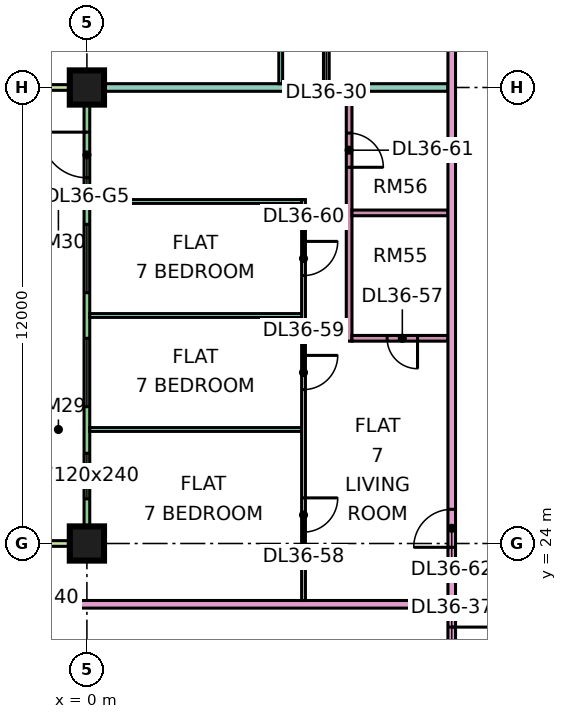
"""IFC4 building model, lengths in metres.
Left out: names, types, materials, properties, quantities, classifications, styles, units other than length and angle.
Written with IfcOpenShell. Run it as: python <this file> out.ifc"""

import sys

from ifc_helpers import new_model, si_unit, direction, frame, frame_2d, origin, origin_2d, place, context, subcontext, project, spatial, rectangle, extrude, element, fill, save


model = new_model("IFC4")
c1 = context("Model", 3, precision=1e-05, world=origin(), true_north=direction((0.0, 1.0)))
c2 = subcontext(c1, "Body", "Model", "MODEL_VIEW")
j1 = project(units=[si_unit("LENGTHUNIT", "METRE"), si_unit("PLANEANGLEUNIT", "RADIAN")], contexts=[c1])
p1 = place(None, origin())
s1 = spatial("IfcSite", under=j1, at=p1, CompositionType="ELEMENT")
p2 = place(p1, origin())
s2 = spatial("IfcBuilding", under=s1, at=p2, CompositionType="ELEMENT")
p3 = place(p2, frame((0.0, 0.0, 161.15)))
s3 = spatial("IfcBuildingStorey", under=s2, at=p3, CompositionType="ELEMENT", Elevation=161.15)
p4 = place(p3, frame((0.0, 24.0, 0.0), z_axis=(0.0, 0.0, 1.0), x_axis=(1.0, 0.0, 0.0)))
e1 = element("IfcColumn", 1, at=p4, inside=s3, PredefinedType="COLUMN", context=c2, shape_type="SweptSolid", body=[
    extrude(rectangle(XDim=0.9, YDim=0.9, at=origin_2d()), origin(), (0.0, 0.0, 1.0), 3.75),
])
p5 = place(p3, frame((0.0, 36.0, 0.0), z_axis=(0.0, 0.0, 1.0), x_axis=(1.0, 0.0, 0.0)))
e2 = element("IfcColumn", 2, at=p5, inside=s3, PredefinedType="COLUMN", context=c2, shape_type="SweptSolid", body=[
    extrude(rectangle(XDim=0.9, YDim=0.9, at=origin_2d()), origin(), (0.0, 0.0, 1.0), 3.75),
])
p6 = place(p3, frame((0.0, 35.925, 0.0), z_axis=(0.0, 0.0, 1.0), x_axis=(0.0, -1.0, 0.0)))
e3 = element("IfcWall", 3, at=p6, inside=s3, PredefinedType="SOLIDWALL", context=c2, shape_type="SweptSolid", body=[
    extrude(rectangle(XDim=11.85, YDim=0.15, at=frame_2d((5.925, 0.0))), origin(), (0.0, 0.0, 1.0), 3.35),
])
p7 = place(p6, frame((1.1, 0.0, 0.0)))
e4 = element("IfcOpeningElement", 4, at=p7, cuts=e3, PredefinedType="OPENING", context=c2, shape_type="SweptSolid", body=[
    extrude(rectangle(XDim=1.2, YDim=2.4, at=frame_2d((0.6, 1.2))), frame((0.0, 0.085, 0.0), z_axis=(0.0, -1.0, 0.0), x_axis=(1.0, 0.0, 0.0)), (0.0, 0.0, 1.0), 0.17),
])
p8 = place(p6, frame((3.525, 0.0, 0.45)))
e5 = element("IfcOpeningElement", 5, at=p8, cuts=e3, PredefinedType="OPENING", context=c2, shape_type="SweptSolid", body=[
    extrude(rectangle(XDim=1.8, YDim=2.4, at=frame_2d((0.9, 1.2))), frame((0.0, 0.085, 0.0), z_axis=(0.0, -1.0, 0.0), x_axis=(1.0, 0.0, 0.0)), (0.0, 0.0, 1.0), 0.17),
])
p9 = place(p6, frame((6.525, 0.0, 0.45)))
e6 = element("IfcOpeningElement", 6, at=p9, cuts=e3, PredefinedType="OPENING", context=c2, shape_type="SweptSolid", body=[
    extrude(rectangle(XDim=1.8, YDim=2.4, at=frame_2d((0.9, 1.2))), frame((0.0, 0.085, 0.0), z_axis=(0.0, -1.0, 0.0), x_axis=(1.0, 0.0, 0.0)), (0.0, 0.0, 1.0), 0.17),
])
p10 = place(p6, frame((9.55, 0.0, 0.45)))
e7 = element("IfcOpeningElement", 7, at=p10, cuts=e3, PredefinedType="OPENING", context=c2, shape_type="SweptSolid", body=[
    extrude(rectangle(XDim=1.2, YDim=2.4, at=frame_2d((0.6, 1.2))), frame((0.0, 0.085, 0.0), z_axis=(0.0, -1.0, 0.0), x_axis=(1.0, 0.0, 0.0)), (0.0, 0.0, 1.0), 0.17),
])
for number, where, z_axis, x_axis in (
    (8, (-1.5, 36.0, 0.0), (0.0, 0.0, 1.0), (1.0, 0.0, 0.0)),
    (9, (-1.5, 24.0, 0.0), (0.0, 0.0, 1.0), (1.0, 0.0, 0.0)),
):
    element("IfcWall", number, at=place(p3, frame(where, z_axis=z_axis, x_axis=x_axis)), inside=s3, PredefinedType="SOLIDWALL", context=c2, shape_type="SweptSolid", body=[
        extrude(rectangle(XDim=1.5, YDim=0.15, at=frame_2d((0.75, 0.0))), origin(), (0.0, 0.0, 1.0), 3.35),
    ])
p11 = place(p3, frame((-1.35, 22.4, 0.0), z_axis=(0.0, 0.0, 1.0), x_axis=(1.0, 0.0, 0.0)))
e10 = element("IfcWall", 10, at=p11, inside=s3, PredefinedType="PARTITIONING", context=c2, shape_type="SweptSolid", body=[
    extrude(rectangle(XDim=10.85, YDim=0.2, at=frame_2d((5.425, 0.0))), origin(), (0.0, 0.0, 1.0), 3.35),
])
e11 = element("IfcWall", 11, at=p5, inside=s3, PredefinedType="PARTITIONING", context=c2, shape_type="SweptSolid", body=[
    extrude(rectangle(XDim=9.5, YDim=0.2, at=frame_2d((4.75, 0.0))), origin(), (0.0, 0.0, 1.0), 3.35),
])
for number, where, z_axis, x_axis in (
    (12, (0.074, 27.0, 0.0), (0.0, 0.0, 1.0), (1.0, 0.0, 0.0)),
    (13, (0.074, 30.0, 0.0), (0.0, 0.0, 1.0), (1.0, 0.0, 0.0)),
    (14, (0.074, 33.0, 0.0), (0.0, 0.0, 1.0), (1.0, 0.0, 0.0)),
):
    element("IfcWall", number, at=place(p3, frame(where, z_axis=z_axis, x_axis=x_axis)), inside=s3, PredefinedType="PARTITIONING", context=c2, shape_type="SweptSolid", body=[
        extrude(rectangle(XDim=5.576, YDim=0.1, at=frame_2d((2.788, 0.0))), origin(), (0.0, 0.0, 1.0), 3.35),
    ])
p12 = place(p3, frame((5.1, 36.1, 0.0), z_axis=(0.0, 0.0, 1.0), x_axis=(0.0, 1.0, 0.0)))
e15 = element("IfcWall", 15, at=p12, inside=s3, PredefinedType="PARTITIONING", context=c2, shape_type="SweptSolid", body=[
    extrude(rectangle(XDim=26.826, YDim=0.1, at=frame_2d((13.413, 0.0))), origin(), (0.0, 0.0, 1.0), 3.35),
])
p13 = place(p12, frame((0.95, 0.0, 0.0)))
e16 = element("IfcOpeningElement", 16, at=p13, cuts=e15, PredefinedType="OPENING", context=c2, shape_type="SweptSolid", body=[
    extrude(rectangle(XDim=0.9, YDim=2.1, at=frame_2d((0.45, 1.05))), frame((0.0, 0.06, 0.0), z_axis=(0.0, -1.0, 0.0), x_axis=(1.0, 0.0, 0.0)), (0.0, 0.0, 1.0), 0.12),
])
p14 = place(p12, frame((3.95, 0.0, 0.0)))
e17 = element("IfcOpeningElement", 17, at=p14, cuts=e15, PredefinedType="OPENING", context=c2, shape_type="SweptSolid", body=[
    extrude(rectangle(XDim=0.9, YDim=2.1, at=frame_2d((0.45, 1.05))), frame((0.0, 0.06, 0.0), z_axis=(0.0, -1.0, 0.0), x_axis=(1.0, 0.0, 0.0)), (0.0, 0.0, 1.0), 0.12),
])
p15 = place(p12, frame((6.95, 0.0, 0.0)))
e18 = element("IfcOpeningElement", 18, at=p15, cuts=e15, PredefinedType="OPENING", context=c2, shape_type="SweptSolid", body=[
    extrude(rectangle(XDim=0.9, YDim=2.1, at=frame_2d((0.45, 1.05))), frame((0.0, 0.06, 0.0), z_axis=(0.0, -1.0, 0.0), x_axis=(1.0, 0.0, 0.0)), (0.0, 0.0, 1.0), 0.12),
])
p16 = place(p12, frame((9.95, 0.0, 0.0)))
e19 = element("IfcOpeningElement", 19, at=p16, cuts=e15, PredefinedType="OPENING", context=c2, shape_type="SweptSolid", body=[
    extrude(rectangle(XDim=0.9, YDim=2.1, at=frame_2d((0.45, 1.05))), frame((0.0, 0.06, 0.0), z_axis=(0.0, -1.0, 0.0), x_axis=(1.0, 0.0, 0.0)), (0.0, 0.0, 1.0), 0.12),
])
p17 = place(p12, frame((21.95, 0.0, 0.0)))
e20 = element("IfcOpeningElement", 20, at=p17, cuts=e15, PredefinedType="OPENING", context=c2, shape_type="SweptSolid", body=[
    extrude(rectangle(XDim=0.9, YDim=2.1, at=frame_2d((0.45, 1.05))), frame((0.0, 0.06, 0.0), z_axis=(0.0, -1.0, 0.0), x_axis=(1.0, 0.0, 0.0)), (0.0, 0.0, 1.0), 0.12),
])
p18 = place(p12, frame((15.95, 0.0, 0.0)))
e21 = element("IfcOpeningElement", 21, at=p18, cuts=e15, PredefinedType="OPENING", context=c2, shape_type="SweptSolid", body=[
    extrude(rectangle(XDim=0.9, YDim=2.1, at=frame_2d((0.45, 1.05))), frame((0.0, 0.06, 0.0), z_axis=(0.0, -1.0, 0.0), x_axis=(1.0, 0.0, 0.0)), (0.0, 0.0, 1.0), 0.12),
])
p19 = place(p12, frame((24.95, 0.0, 0.0)))
e22 = element("IfcOpeningElement", 22, at=p19, cuts=e15, PredefinedType="OPENING", context=c2, shape_type="SweptSolid", body=[
    extrude(rectangle(XDim=0.9, YDim=2.1, at=frame_2d((0.45, 1.05))), frame((0.0, 0.06, 0.0), z_axis=(0.0, -1.0, 0.0), x_axis=(1.0, 0.0, 0.0)), (0.0, 0.0, 1.0), 0.12),
])
p20 = place(p3, frame((5.7, 22.5, 0.0), z_axis=(0.0, 0.0, 1.0), x_axis=(0.0, 1.0, 0.0)))
e23 = element("IfcWall", 23, at=p20, inside=s3, PredefinedType="PARTITIONING", context=c2, shape_type="SweptSolid", body=[
    extrude(rectangle(XDim=10.55, YDim=0.1, at=frame_2d((5.275, 0.0))), origin(), (0.0, 0.0, 1.0), 3.35),
])
p21 = place(p20, frame((1.8, 0.0, 0.0)))
e24 = element("IfcOpeningElement", 24, at=p21, cuts=e23, PredefinedType="OPENING", context=c2, shape_type="SweptSolid", body=[
    extrude(rectangle(XDim=0.9, YDim=2.1, at=frame_2d((0.45, 1.05))), frame((0.0, 0.06, 0.0), z_axis=(0.0, -1.0, 0.0), x_axis=(1.0, 0.0, 0.0)), (0.0, 0.0, 1.0), 0.12),
])
p22 = place(p20, frame((5.55, 0.0, 0.0)))
e25 = element("IfcOpeningElement", 25, at=p22, cuts=e23, PredefinedType="OPENING", context=c2, shape_type="SweptSolid", body=[
    extrude(rectangle(XDim=0.9, YDim=2.1, at=frame_2d((0.45, 1.05))), frame((0.0, 0.06, 0.0), z_axis=(0.0, -1.0, 0.0), x_axis=(1.0, 0.0, 0.0)), (0.0, 0.0, 1.0), 0.12),
])
p23 = place(p20, frame((8.55, 0.0, 0.0)))
e26 = element("IfcOpeningElement", 26, at=p23, cuts=e23, PredefinedType="OPENING", context=c2, shape_type="SweptSolid", body=[
    extrude(rectangle(XDim=0.9, YDim=2.1, at=frame_2d((0.45, 1.05))), frame((0.0, 0.06, 0.0), z_axis=(0.0, -1.0, 0.0), x_axis=(1.0, 0.0, 0.0)), (0.0, 0.0, 1.0), 0.12),
])
p24 = place(p3, frame((6.3, 36.1, 0.0), z_axis=(0.0, 0.0, 1.0), x_axis=(0.0, 1.0, 0.0)))
e27 = element("IfcWall", 27, at=p24, inside=s3, PredefinedType="PARTITIONING", context=c2, shape_type="SweptSolid", body=[
    extrude(rectangle(XDim=23.65, YDim=0.15, at=frame_2d((11.825, 0.0))), origin(), (0.0, 0.0, 1.0), 3.35),
])
p25 = place(p24, frame((15.95, 0.0, 0.0)))
e28 = element("IfcOpeningElement", 28, at=p25, cuts=e27, PredefinedType="OPENING", context=c2, shape_type="SweptSolid", body=[
    extrude(rectangle(XDim=0.8, YDim=2.1, at=frame_2d((0.4, 1.05))), frame((0.0, 0.085, 0.0), z_axis=(0.0, -1.0, 0.0), x_axis=(1.0, 0.0, 0.0)), (0.0, 0.0, 1.0), 0.17),
])
p26 = place(p24, frame((5.75, 0.0, 0.0)))
e29 = element("IfcOpeningElement", 29, at=p26, cuts=e27, PredefinedType="OPENING", context=c2, shape_type="SweptSolid", body=[
    extrude(rectangle(XDim=0.9, YDim=2.1, at=frame_2d((0.45, 1.05))), frame((0.0, 0.085, 0.0), z_axis=(0.0, -1.0, 0.0), x_axis=(1.0, 0.0, 0.0)), (0.0, 0.0, 1.0), 0.17),
])
p27 = place(p24, frame((0.95, 0.0, 0.0)))
e30 = element("IfcOpeningElement", 30, at=p27, cuts=e27, PredefinedType="OPENING", context=c2, shape_type="SweptSolid", body=[
    extrude(rectangle(XDim=0.8, YDim=2.1, at=frame_2d((0.4, 1.05))), frame((0.0, 0.085, 0.0), z_axis=(0.0, -1.0, 0.0), x_axis=(1.0, 0.0, 0.0)), (0.0, 0.0, 1.0), 0.17),
])
p28 = place(p24, frame((10.55, 0.0, 0.0)))
e31 = element("IfcOpeningElement", 31, at=p28, cuts=e27, PredefinedType="OPENING", context=c2, shape_type="SweptSolid", body=[
    extrude(rectangle(XDim=0.8, YDim=2.1, at=frame_2d((0.4, 1.05))), frame((0.0, 0.085, 0.0), z_axis=(0.0, -1.0, 0.0), x_axis=(1.0, 0.0, 0.0)), (0.0, 0.0, 1.0), 0.17),
])
p29 = place(p24, frame((13.4, 0.0, 0.0)))
e32 = element("IfcOpeningElement", 32, at=p29, cuts=e27, PredefinedType="OPENING", context=c2, shape_type="SweptSolid", body=[
    extrude(rectangle(XDim=0.8, YDim=2.1, at=frame_2d((0.4, 1.05))), frame((0.0, 0.085, 0.0), z_axis=(0.0, -1.0, 0.0), x_axis=(1.0, 0.0, 0.0)), (0.0, 0.0, 1.0), 0.17),
])
p30 = place(p3, frame((6.9, 29.325, 0.0), z_axis=(0.0, 0.0, 1.0), x_axis=(0.0, 1.0, 0.0)))
e33 = element("IfcWall", 33, at=p30, inside=s3, PredefinedType="PARTITIONING", context=c2, shape_type="SweptSolid", body=[
    extrude(rectangle(XDim=6.575, YDim=0.15, at=frame_2d((3.288, 0.0))), origin(), (0.0, 0.0, 1.0), 3.35),
])
p31 = place(p30, frame((4.575, 0.0, 0.0)))
e34 = element("IfcOpeningElement", 34, at=p31, cuts=e33, PredefinedType="OPENING", context=c2, shape_type="SweptSolid", body=[
    extrude(rectangle(XDim=0.9, YDim=2.1, at=frame_2d((0.45, 1.05))), frame((0.0, 0.085, 0.0), z_axis=(0.0, -1.0, 0.0), x_axis=(1.0, 0.0, 0.0)), (0.0, 0.0, 1.0), 0.17),
])
p32 = place(p3, frame((6.975, 29.4, 0.0), z_axis=(0.0, 0.0, 1.0), x_axis=(1.0, 0.0, 0.0)))
e35 = element("IfcWall", 35, at=p32, inside=s3, PredefinedType="PARTITIONING", context=c2, shape_type="SweptSolid", body=[
    extrude(rectangle(XDim=2.525, YDim=0.15, at=frame_2d((1.262, 0.0))), origin(), (0.0, 0.0, 1.0), 3.35),
])
p33 = place(p32, frame((0.925, 0.0, 0.0)))
e36 = element("IfcOpeningElement", 36, at=p33, cuts=e35, PredefinedType="OPENING", context=c2, shape_type="SweptSolid", body=[
    extrude(rectangle(XDim=0.8, YDim=2.1, at=frame_2d((0.4, 1.05))), frame((0.0, 0.085, 0.0), z_axis=(0.0, -1.0, 0.0), x_axis=(1.0, 0.0, 0.0)), (0.0, 0.0, 1.0), 0.17),
])
p34 = place(p3, frame((6.975, 32.7, 0.0), z_axis=(0.0, 0.0, 1.0), x_axis=(1.0, 0.0, 0.0)))
e37 = element("IfcWall", 37, at=p34, inside=s3, PredefinedType="PARTITIONING", context=c2, shape_type="SweptSolid", body=[
    extrude(rectangle(XDim=2.525, YDim=0.15, at=frame_2d((1.262, 0.0))), origin(), (0.0, 0.0, 1.0), 3.35),
])
p35 = place(p3, frame((9.6, 20.0, 0.0), z_axis=(0.0, 0.0, 1.0), x_axis=(0.0, 1.0, 0.0)))
e38 = element("IfcWall", 38, at=p35, inside=s3, PredefinedType="PARTITIONING", context=c2, shape_type="SweptSolid", body=[
    extrude(rectangle(XDim=42.926, YDim=0.2, at=frame_2d((21.463, 0.0))), origin(), (0.0, 0.0, 1.0), 3.35),
])
p36 = place(p35, frame((40.8, 0.0, 0.0)))
e39 = element("IfcOpeningElement", 39, at=p36, cuts=e38, PredefinedType="OPENING", context=c2, shape_type="SweptSolid", body=[
    extrude(rectangle(XDim=1.0, YDim=2.1, at=frame_2d((0.5, 1.05))), frame((0.0, 0.11, 0.0), z_axis=(0.0, -1.0, 0.0), x_axis=(1.0, 0.0, 0.0)), (0.0, 0.0, 1.0), 0.22),
])
p37 = place(p35, frame((0.6, 0.0, 0.0)))
e40 = element("IfcOpeningElement", 40, at=p37, cuts=e38, PredefinedType="OPENING", context=c2, shape_type="SweptSolid", body=[
    extrude(rectangle(XDim=1.2, YDim=2.1, at=frame_2d((0.6, 1.05))), frame((0.0, 0.11, 0.0), z_axis=(0.0, -1.0, 0.0), x_axis=(1.0, 0.0, 0.0)), (0.0, 0.0, 1.0), 0.22),
])
p38 = place(p35, frame((3.9, 0.0, 0.0)))
e41 = element("IfcOpeningElement", 41, at=p38, cuts=e38, PredefinedType="OPENING", context=c2, shape_type="SweptSolid", body=[
    extrude(rectangle(XDim=1.0, YDim=2.1, at=frame_2d((0.5, 1.05))), frame((0.0, 0.11, 0.0), z_axis=(0.0, -1.0, 0.0), x_axis=(1.0, 0.0, 0.0)), (0.0, 0.0, 1.0), 0.22),
])
p39 = place(p7, frame((1.2, 0.0, 0.0), z_axis=(0.0, 0.0, 1.0), x_axis=(-1.0, 0.0, 0.0)))
e42 = element("IfcDoor", 42, at=p39, inside=s3, OperationType="DOUBLE_DOOR_SINGLE_SWING", PredefinedType="DOOR", context=c2, shape_type="SweptSolid", body=[
    extrude(rectangle(XDim=1.2, YDim=2.4, at=frame_2d((0.6, 1.2))), frame((0.0, 0.025, 0.0), z_axis=(0.0, -1.0, 0.0), x_axis=(1.0, 0.0, 0.0)), (0.0, 0.0, 1.0), 0.05),
])
fill(e4, e42)
p40 = place(p8, origin())
e43 = element("IfcWindow", 43, at=p40, inside=s3, PartitioningType="SINGLE_PANEL", PredefinedType="WINDOW", context=c2, shape_type="SweptSolid", body=[
    extrude(rectangle(XDim=1.8, YDim=2.4, at=frame_2d((0.9, 1.2))), frame((0.0, 0.03, 0.0), z_axis=(0.0, -1.0, 0.0), x_axis=(1.0, 0.0, 0.0)), (0.0, 0.0, 1.0), 0.06),
])
fill(e5, e43)
p41 = place(p9, origin())
e44 = element("IfcWindow", 44, at=p41, inside=s3, PartitioningType="SINGLE_PANEL", PredefinedType="WINDOW", context=c2, shape_type="SweptSolid", body=[
    extrude(rectangle(XDim=1.8, YDim=2.4, at=frame_2d((0.9, 1.2))), frame((0.0, 0.03, 0.0), z_axis=(0.0, -1.0, 0.0), x_axis=(1.0, 0.0, 0.0)), (0.0, 0.0, 1.0), 0.06),
])
fill(e6, e44)
p42 = place(p10, origin())
e45 = element("IfcWindow", 45, at=p42, inside=s3, PartitioningType="SINGLE_PANEL", PredefinedType="WINDOW", context=c2, shape_type="SweptSolid", body=[
    extrude(rectangle(XDim=1.2, YDim=2.4, at=frame_2d((0.6, 1.2))), frame((0.0, 0.03, 0.0), z_axis=(0.0, -1.0, 0.0), x_axis=(1.0, 0.0, 0.0)), (0.0, 0.0, 1.0), 0.06),
])
fill(e7, e45)
p43 = place(p37, origin())
e46 = element("IfcDoor", 46, at=p43, inside=s3, OperationType="SINGLE_SWING_RIGHT", PredefinedType="DOOR", context=c2, shape_type="SweptSolid", body=[
    extrude(rectangle(XDim=1.2, YDim=2.1, at=frame_2d((0.6, 1.05))), frame((0.0, 0.025, 0.0), z_axis=(0.0, -1.0, 0.0), x_axis=(1.0, 0.0, 0.0)), (0.0, 0.0, 1.0), 0.05),
])
fill(e40, e46)
p44 = place(p33, origin())
e47 = element("IfcDoor", 47, at=p44, inside=s3, OperationType="SINGLE_SWING_RIGHT", PredefinedType="DOOR", context=c2, shape_type="SweptSolid", body=[
    extrude(rectangle(XDim=0.8, YDim=2.1, at=frame_2d((0.4, 1.05))), frame((0.0, 0.025, 0.0), z_axis=(0.0, -1.0, 0.0), x_axis=(1.0, 0.0, 0.0)), (0.0, 0.0, 1.0), 0.05),
])
fill(e36, e47)
p45 = place(p21, origin())
e48 = element("IfcDoor", 48, at=p45, inside=s3, OperationType="SINGLE_SWING_RIGHT", PredefinedType="DOOR", context=c2, shape_type="SweptSolid", body=[
    extrude(rectangle(XDim=0.9, YDim=2.1, at=frame_2d((0.45, 1.05))), frame((0.0, 0.025, 0.0), z_axis=(0.0, -1.0, 0.0), x_axis=(1.0, 0.0, 0.0)), (0.0, 0.0, 1.0), 0.05),
])
fill(e24, e48)
p46 = place(p22, origin())
e49 = element("IfcDoor", 49, at=p46, inside=s3, OperationType="SINGLE_SWING_RIGHT", PredefinedType="DOOR", context=c2, shape_type="SweptSolid", body=[
    extrude(rectangle(XDim=0.9, YDim=2.1, at=frame_2d((0.45, 1.05))), frame((0.0, 0.025, 0.0), z_axis=(0.0, -1.0, 0.0), x_axis=(1.0, 0.0, 0.0)), (0.0, 0.0, 1.0), 0.05),
])
fill(e25, e49)
p47 = place(p23, origin())
e50 = element("IfcDoor", 50, at=p47, inside=s3, OperationType="SINGLE_SWING_RIGHT", PredefinedType="DOOR", context=c2, shape_type="SweptSolid", body=[
    extrude(rectangle(XDim=0.9, YDim=2.1, at=frame_2d((0.45, 1.05))), frame((0.0, 0.025, 0.0), z_axis=(0.0, -1.0, 0.0), x_axis=(1.0, 0.0, 0.0)), (0.0, 0.0, 1.0), 0.05),
])
fill(e26, e50)
p48 = place(p31, frame((0.9, 0.0, 0.0), z_axis=(0.0, 0.0, 1.0), x_axis=(-1.0, 0.0, 0.0)))
e51 = element("IfcDoor", 51, at=p48, inside=s3, OperationType="SINGLE_SWING_LEFT", PredefinedType="DOOR", context=c2, shape_type="SweptSolid", body=[
    extrude(rectangle(XDim=0.9, YDim=2.1, at=frame_2d((0.45, 1.05))), frame((0.0, 0.025, 0.0), z_axis=(0.0, -1.0, 0.0), x_axis=(1.0, 0.0, 0.0)), (0.0, 0.0, 1.0), 0.05),
])
fill(e34, e51)
p49 = place(p38, origin())
e52 = element("IfcDoor", 52, at=p49, inside=s3, OperationType="SINGLE_SWING_LEFT", PredefinedType="DOOR", context=c2, shape_type="SweptSolid", body=[
    extrude(rectangle(XDim=1.0, YDim=2.1, at=frame_2d((0.5, 1.05))), frame((0.0, 0.025, 0.0), z_axis=(0.0, -1.0, 0.0), x_axis=(1.0, 0.0, 0.0)), (0.0, 0.0, 1.0), 0.05),
])
fill(e41, e52)
save(model, sys.argv[1])
